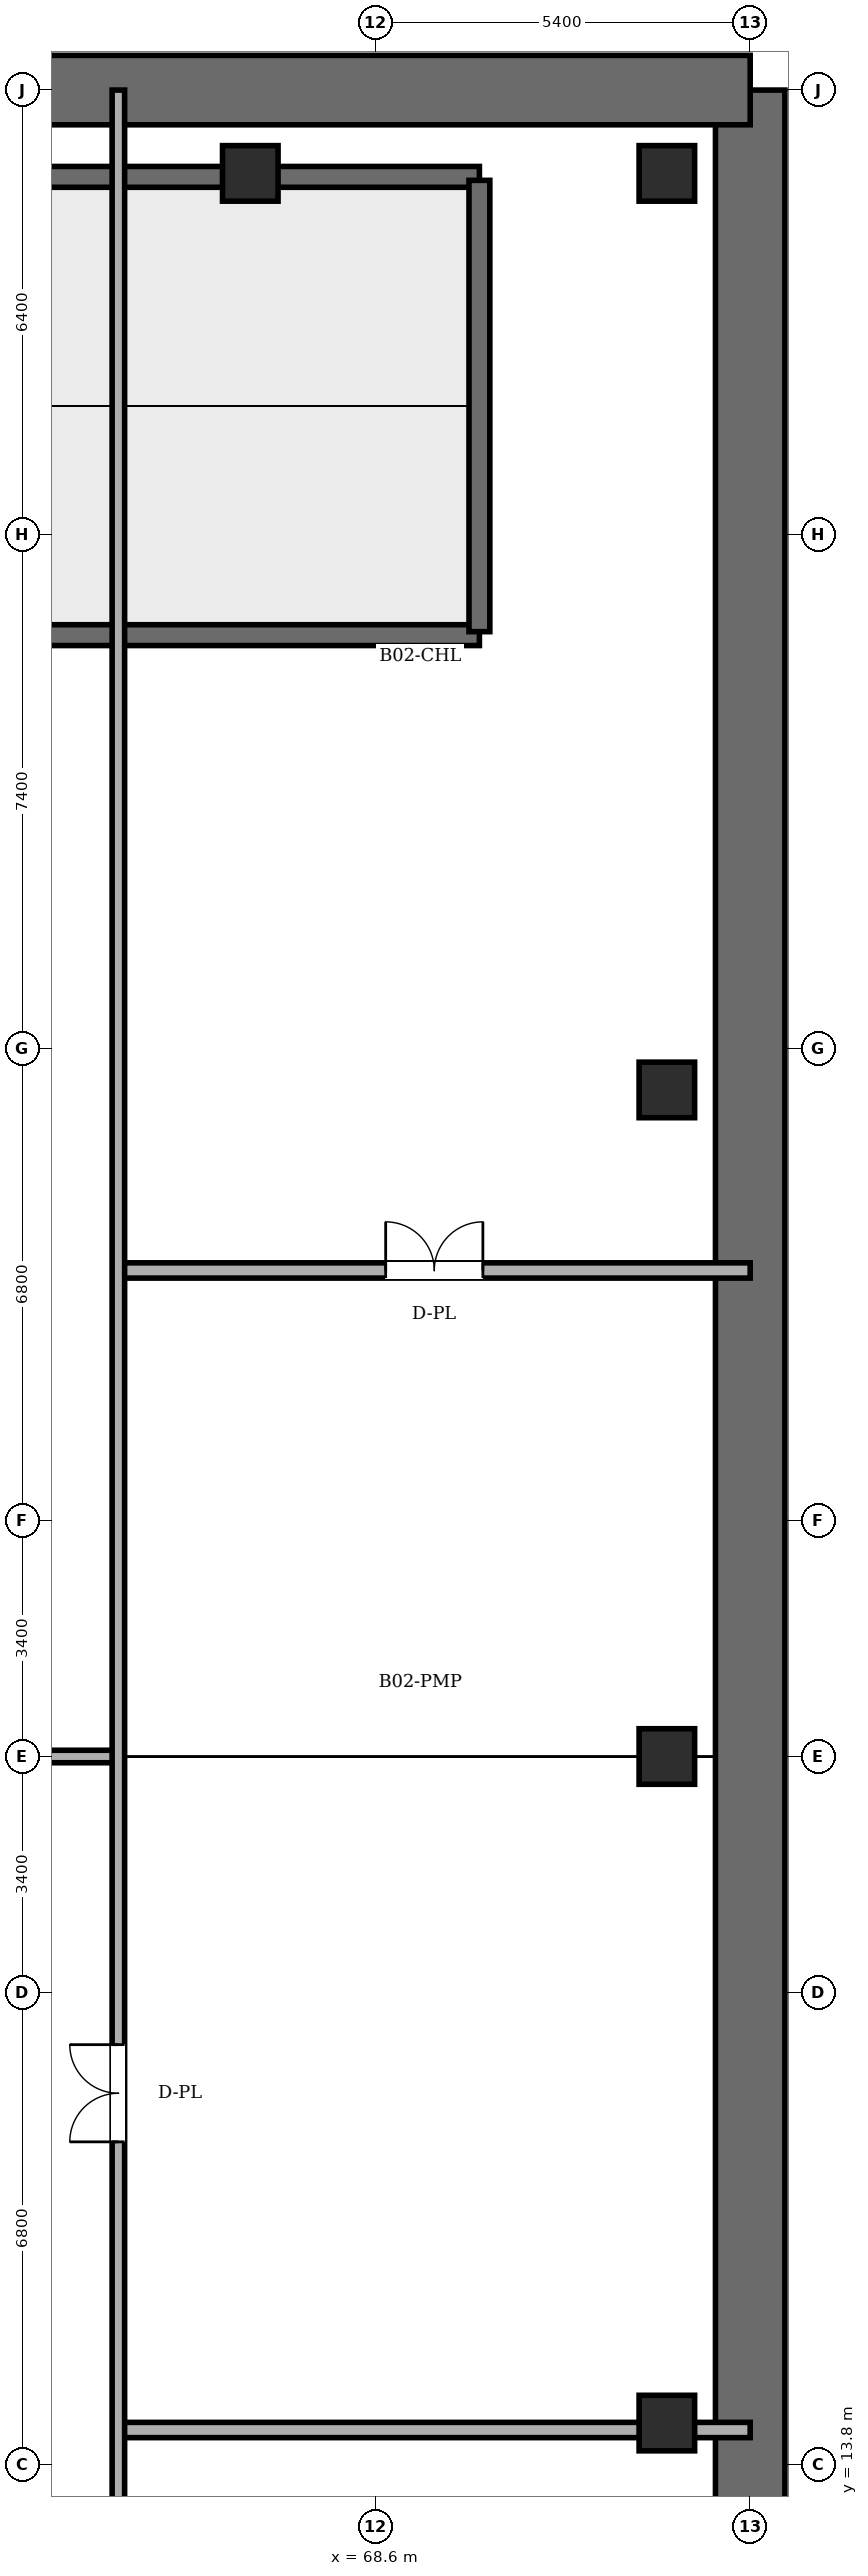
"""IFC4 building model, lengths in metres.
Left out: names, types, materials, properties, quantities, classifications, styles, units other than length and angle.
Written with IfcOpenShell. Run it as: python <this file> out.ifc"""

import sys

from ifc_helpers import new_model, si_unit, direction, frame, frame_2d, origin, origin_2d, place, context, subcontext, project, spatial, rectangle, extrude, element, fill, save


model = new_model("IFC4")
c1 = context("Model", 3, precision=1e-05, world=origin(), true_north=direction((0.0, 1.0)))
c2 = subcontext(c1, "Body", "Model", "MODEL_VIEW")
j1 = project(units=[si_unit("LENGTHUNIT", "METRE"), si_unit("PLANEANGLEUNIT", "RADIAN")], contexts=[c1])
p1 = place(None, origin())
s1 = spatial("IfcSite", under=j1, at=p1, CompositionType="ELEMENT")
p2 = place(p1, origin())
s2 = spatial("IfcBuilding", under=s1, at=p2, CompositionType="ELEMENT")
p3 = place(p2, frame((0.0, 0.0, -8.4)))
s3 = spatial("IfcBuildingStorey", under=s2, at=p3, CompositionType="ELEMENT", Elevation=-8.4)
for number, where, z_axis, x_axis in (
    (1, (72.8, 14.4, 0.0), (0.0, 0.0, 1.0), (1.0, 0.0, 0.0)),
    (2, (72.8, 24.0, 0.0), (0.0, 0.0, 1.0), (1.0, 0.0, 0.0)),
    (3, (72.8, 33.6, 0.0), (0.0, 0.0, 1.0), (1.0, 0.0, 0.0)),
    (4, (72.8, 46.8, 0.0), (0.0, 0.0, 1.0), (1.0, 0.0, 0.0)),
    (5, (66.8, 46.8, 0.0), (0.0, 0.0, 1.0), (1.0, 0.0, 0.0)),
):
    element("IfcColumn", number, at=place(p3, frame(where, z_axis=z_axis, x_axis=x_axis)), inside=s3, PredefinedType="COLUMN", context=c2, shape_type="SweptSolid", body=[
        extrude(rectangle(XDim=0.8, YDim=0.8, at=origin_2d()), origin(), (0.0, 0.0, 1.0), 4.2),
    ])
p4 = place(p3, frame((74.0, 0.0, 0.0), z_axis=(0.0, 0.0, 1.0), x_axis=(0.0, 1.0, 0.0)))
e6 = element("IfcWall", 6, at=p4, inside=s3, PredefinedType="SOLIDWALL", context=c2, shape_type="SweptSolid", body=[
    extrude(rectangle(XDim=48.0, YDim=1.0, at=frame_2d((24.0, 0.0))), origin(), (0.0, 0.0, 1.0), 3.95),
])
p5 = place(p3, frame((74.0, 48.0, 0.0), z_axis=(0.0, 0.0, 1.0), x_axis=(-1.0, 0.0, 0.0)))
e7 = element("IfcWall", 7, at=p5, inside=s3, PredefinedType="SOLIDWALL", context=c2, shape_type="SweptSolid", body=[
    extrude(rectangle(XDim=72.4, YDim=1.0, at=frame_2d((36.2, 0.0))), origin(), (0.0, 0.0, 1.0), 3.95),
])
for number, where, z_axis, x_axis in (
    (8, (38.0, 40.15, 0.0), (0.0, 0.0, 1.0), (1.0, 0.0, 0.0)),
    (9, (38.0, 46.75, 0.0), (0.0, 0.0, 1.0), (1.0, 0.0, 0.0)),
):
    element("IfcWall", number, at=place(p3, frame(where, z_axis=z_axis, x_axis=x_axis)), inside=s3, PredefinedType="SOLIDWALL", context=c2, shape_type="SweptSolid", body=[
        extrude(rectangle(XDim=32.1, YDim=0.3, at=frame_2d((16.05, 0.0))), origin(), (0.0, 0.0, 1.0), 3.95),
    ])
p6 = place(p3, frame((64.9, 14.3, 0.0), z_axis=(0.0, 0.0, 1.0), x_axis=(1.0, 0.0, 0.0)))
e10 = element("IfcWall", 10, at=p6, inside=s3, PredefinedType="PARTITIONING", context=c2, shape_type="SweptSolid", body=[
    extrude(rectangle(XDim=9.1, YDim=0.22, at=frame_2d((4.55, 0.0))), origin(), (0.0, 0.0, 1.0), 3.95),
])
p7 = place(p3, frame((58.4, 24.0, 0.0), z_axis=(0.0, 0.0, 1.0), x_axis=(1.0, 0.0, 0.0)))
e11 = element("IfcWall", 11, at=p7, inside=s3, PredefinedType="PARTITIONING", context=c2, shape_type="SweptSolid", body=[
    extrude(rectangle(XDim=6.5, YDim=0.18, at=frame_2d((3.25, 0.0))), origin(), (0.0, 0.0, 1.0), 3.95),
])
p8 = place(p3, frame((64.9, 31.0, 0.0), z_axis=(0.0, 0.0, 1.0), x_axis=(1.0, 0.0, 0.0)))
e12 = element("IfcWall", 12, at=p8, inside=s3, PredefinedType="PARTITIONING", context=c2, shape_type="SweptSolid", body=[
    extrude(rectangle(XDim=9.1, YDim=0.22, at=frame_2d((4.55, 0.0))), origin(), (0.0, 0.0, 1.0), 3.95),
])
p9 = place(p8, frame((3.85, 0.0, 0.0)))
e13 = element("IfcOpeningElement", 13, at=p9, cuts=e12, PredefinedType="OPENING", context=c2, shape_type="SweptSolid", body=[
    extrude(rectangle(XDim=1.4, YDim=2.25, at=frame_2d((0.7, 1.125))), frame((0.0, 0.12, 0.0), z_axis=(0.0, -1.0, 0.0), x_axis=(1.0, 0.0, 0.0)), (0.0, 0.0, 1.0), 0.24),
])
p10 = place(p3, frame((64.9, 8.2, 0.0), z_axis=(0.0, 0.0, 1.0), x_axis=(0.0, 1.0, 0.0)))
e14 = element("IfcWall", 14, at=p10, inside=s3, PredefinedType="PARTITIONING", context=c2, shape_type="SweptSolid", body=[
    extrude(rectangle(XDim=39.8, YDim=0.18, at=frame_2d((19.9, 0.0))), origin(), (0.0, 0.0, 1.0), 3.95),
])
p11 = place(p10, frame((10.25, 0.0, 0.0)))
e15 = element("IfcOpeningElement", 15, at=p11, cuts=e14, PredefinedType="OPENING", context=c2, shape_type="SweptSolid", body=[
    extrude(rectangle(XDim=1.4, YDim=2.25, at=frame_2d((0.7, 1.125))), frame((0.0, 0.1, 0.0), z_axis=(0.0, -1.0, 0.0), x_axis=(1.0, 0.0, 0.0)), (0.0, 0.0, 1.0), 0.2),
])
p12 = place(p3, frame((70.1, 40.2, 0.0), z_axis=(0.0, 0.0, 1.0), x_axis=(0.0, 1.0, 0.0)))
e16 = element("IfcWall", 16, at=p12, inside=s3, PredefinedType="SOLIDWALL", context=c2, shape_type="SweptSolid", body=[
    extrude(rectangle(XDim=6.5, YDim=0.3, at=frame_2d((3.25, 0.0))), origin(), (0.0, 0.0, 1.0), 3.95),
])
p13 = place(p11, origin())
e17 = element("IfcDoor", 17, at=p13, inside=s3, OperationType="DOUBLE_DOOR_SINGLE_SWING", PredefinedType="DOOR", context=c2, shape_type="SweptSolid", body=[
    extrude(rectangle(XDim=1.4, YDim=2.25, at=frame_2d((0.7, 1.125))), frame((0.0, 0.025, 0.0), z_axis=(0.0, -1.0, 0.0), x_axis=(1.0, 0.0, 0.0)), (0.0, 0.0, 1.0), 0.05),
])
fill(e15, e17)
p14 = place(p9, origin())
e18 = element("IfcDoor", 18, at=p14, inside=s3, OperationType="DOUBLE_DOOR_SINGLE_SWING", PredefinedType="DOOR", context=c2, shape_type="SweptSolid", body=[
    extrude(rectangle(XDim=1.4, YDim=2.25, at=frame_2d((0.7, 1.125))), frame((0.0, 0.025, 0.0), z_axis=(0.0, -1.0, 0.0), x_axis=(1.0, 0.0, 0.0)), (0.0, 0.0, 1.0), 0.05),
])
fill(e13, e18)
save(model, sys.argv[1])
